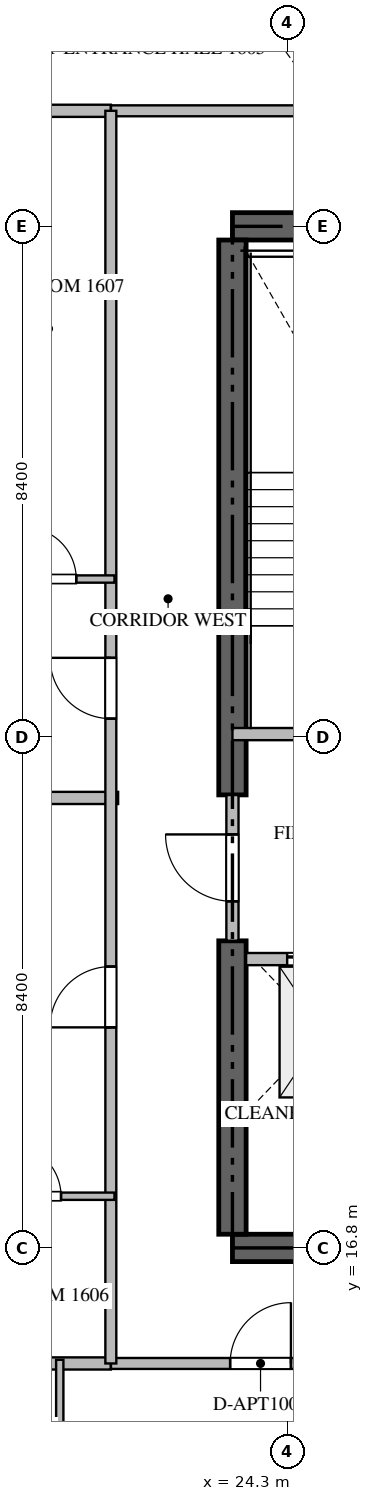
"""IFC4 building model, lengths in metres.
Left out: names, types, materials, properties, quantities, classifications, styles, units other than length and angle.
Written with IfcOpenShell. Run it as: python <this file> out.ifc"""

import sys

from ifc_helpers import new_model, si_unit, direction, frame, frame_2d, origin, place, context, subcontext, project, spatial, rectangle, extrude, source, transform, mapped, element, fill, save


model = new_model("IFC4")
c1 = context("Model", 3, precision=1e-05, world=origin(), true_north=direction((0.0, 1.0)))
c2 = subcontext(c1, "Body", "Model", "MODEL_VIEW")
j1 = project(units=[si_unit("LENGTHUNIT", "METRE"), si_unit("PLANEANGLEUNIT", "RADIAN")], contexts=[c1])
p1 = place(None, origin())
s1 = spatial("IfcSite", under=j1, at=p1, CompositionType="ELEMENT")
p2 = place(p1, origin())
s2 = spatial("IfcBuilding", under=s1, at=p2, CompositionType="ELEMENT")
p3 = place(p2, frame((0.0, 0.0, 67.95)))
s3 = spatial("IfcBuildingStorey", under=s2, at=p3, CompositionType="ELEMENT", Elevation=67.95)
for number, where, z_axis, x_axis in (
    (1, (23.4, 16.8, -0.26), (0.0, 0.0, 1.0), (1.0, 0.0, 0.0)),
    (2, (41.4, 33.6, -0.26), (0.0, 0.0, 1.0), (-1.0, 0.0, 0.0)),
):
    element("IfcWall", number, at=place(p3, frame(where, z_axis=z_axis, x_axis=x_axis)), inside=s3, PredefinedType="SHEAR", context=c2, shape_type="SweptSolid", body=[
        extrude(rectangle(XDim=18.0, YDim=0.45, at=frame_2d((9.0, 0.0))), origin(), (0.0, 0.0, 1.0), 3.748),
    ])
p4 = place(p3, frame((23.4, 17.025, -0.26), z_axis=(0.0, 0.0, 1.0), x_axis=(0.0, 1.0, 0.0)))
e3 = element("IfcWall", 3, at=p4, inside=s3, PredefinedType="SHEAR", context=c2, shape_type="SweptSolid", body=[
    extrude(rectangle(XDim=4.825, YDim=0.45, at=frame_2d((2.413, 0.0))), origin(), (0.0, 0.0, 1.0), 3.748),
])
p5 = place(p3, frame((23.4, 24.25, -0.26), z_axis=(0.0, 0.0, 1.0), x_axis=(0.0, 1.0, 0.0)))
e4 = element("IfcWall", 4, at=p5, inside=s3, PredefinedType="SHEAR", context=c2, shape_type="SweptSolid", body=[
    extrude(rectangle(XDim=9.125, YDim=0.45, at=frame_2d((4.562, 0.0))), origin(), (0.0, 0.0, 1.0), 3.748),
])
p6 = place(p3, frame((23.4, 25.25, 0.0), z_axis=(0.0, 0.0, 1.0), x_axis=(1.0, 0.0, 0.0)))
e5 = element("IfcWall", 5, at=p6, inside=s3, PredefinedType="STANDARD", context=c2, shape_type="SweptSolid", body=[
    extrude(rectangle(XDim=4.45, YDim=0.2, at=frame_2d((2.225, 0.0))), origin(), (0.0, 0.0, 1.0), 3.49),
])
p7 = place(p6, frame((1.65, 0.0, 0.0)))
e6 = element("IfcOpeningElement", 6, at=p7, cuts=e5, PredefinedType="OPENING", context=c2, shape_type="SweptSolid", body=[
    extrude(rectangle(XDim=1.1, YDim=2.15, at=frame_2d((0.55, 1.075))), frame((0.0, 0.11, 0.0), z_axis=(0.0, -1.0, 0.0), x_axis=(1.0, 0.0, 0.0)), (0.0, 0.0, 1.0), 0.22),
])
p8 = place(p3, frame((23.625, 21.55, 0.0), z_axis=(0.0, 0.0, 1.0), x_axis=(1.0, 0.0, 0.0)))
e7 = element("IfcWall", 7, at=p8, inside=s3, PredefinedType="STANDARD", context=c2, shape_type="SweptSolid", body=[
    extrude(rectangle(XDim=2.425, YDim=0.2, at=frame_2d((1.212, 0.0))), origin(), (0.0, 0.0, 1.0), 3.49),
])
p9 = place(p8, frame((0.675, 0.0, 0.0)))
e8 = element("IfcOpeningElement", 8, at=p9, cuts=e7, PredefinedType="OPENING", context=c2, shape_type="SweptSolid", body=[
    extrude(rectangle(XDim=1.2, YDim=2.2, at=frame_2d((0.6, 1.1))), frame((0.0, 0.11, 0.0), z_axis=(0.0, -1.0, 0.0), x_axis=(1.0, 0.0, 0.0)), (0.0, 0.0, 1.0), 0.22),
])
p10 = place(p3, frame((23.625, 19.05, 0.0), z_axis=(0.0, 0.0, 1.0), x_axis=(1.0, 0.0, 0.0)))
e9 = element("IfcWall", 9, at=p10, inside=s3, PredefinedType="STANDARD", context=c2, shape_type="SweptSolid", body=[
    extrude(rectangle(XDim=2.425, YDim=0.2, at=frame_2d((1.212, 0.0))), origin(), (0.0, 0.0, 1.0), 3.49),
])
p11 = place(p3, frame((23.4, 21.852, 0.0), z_axis=(0.0, 0.0, 1.0), x_axis=(0.0, 1.0, 0.0)))
e10 = element("IfcWall", 10, at=p11, inside=s3, PredefinedType="STANDARD", context=c2, shape_type="SweptSolid", body=[
    extrude(rectangle(XDim=2.396, YDim=0.2, at=frame_2d((1.198, 0.0))), origin(), (0.0, 0.0, 1.0), 3.49),
])
p12 = place(p11, frame((0.648, 0.0, 0.0)))
e11 = element("IfcOpeningElement", 11, at=p12, cuts=e10, PredefinedType="OPENING", context=c2, shape_type="SweptSolid", body=[
    extrude(rectangle(XDim=1.1, YDim=2.15, at=frame_2d((0.55, 1.075))), frame((0.0, 0.11, 0.0), z_axis=(0.0, -1.0, 0.0), x_axis=(1.0, 0.0, 0.0)), (0.0, 0.0, 1.0), 0.22),
])
p13 = place(p3, frame((6.082, 24.2, 0.0), z_axis=(0.0, 0.0, 1.0), x_axis=(1.0, 0.0, 0.0)))
e12 = element("IfcWall", 12, at=p13, inside=s3, PredefinedType="PARTITIONING", context=c2, shape_type="SweptSolid", body=[
    extrude(rectangle(XDim=15.438, YDim=0.2, at=frame_2d((7.719, 0.0))), origin(), (0.0, 0.0, 1.0), 3.49),
])
for number, where, z_axis, x_axis in (
    (13, (6.082, 14.9, 0.0), (0.0, 0.0, 1.0), (1.0, 0.0, 0.0)),
    (14, (6.082, 35.5, 0.0), (0.0, 0.0, 1.0), (1.0, 0.0, 0.0)),
):
    element("IfcWall", number, at=place(p3, frame(where, z_axis=z_axis, x_axis=x_axis)), inside=s3, PredefinedType="PARTITIONING", context=c2, shape_type="SweptSolid", body=[
        extrude(rectangle(XDim=15.318, YDim=0.2, at=frame_2d((7.659, 0.0))), origin(), (0.0, 0.0, 1.0), 3.49),
    ])
p14 = place(p3, frame((21.402, 14.9, 0.0), z_axis=(0.0, 0.0, 1.0), x_axis=(1.0, 0.0, 0.0)))
e15 = element("IfcWall", 15, at=p14, inside=s3, PredefinedType="PARTITIONING", context=c2, shape_type="SweptSolid", body=[
    extrude(rectangle(XDim=21.996, YDim=0.18, at=frame_2d((10.998, 0.0))), origin(), (0.0, 0.0, 1.0), 3.49),
])
p15 = place(p14, frame((1.96, 0.0, 0.0)))
e16 = element("IfcOpeningElement", 16, at=p15, cuts=e15, PredefinedType="OPENING", context=c2, shape_type="SweptSolid", body=[
    extrude(rectangle(XDim=1.0, YDim=2.15, at=frame_2d((0.5, 1.075))), frame((0.0, 0.1, 0.0), z_axis=(0.0, -1.0, 0.0), x_axis=(1.0, 0.0, 0.0)), (0.0, 0.0, 1.0), 0.2),
])
p16 = place(p14, frame((5.249, 0.0, 0.0)))
e17 = element("IfcOpeningElement", 17, at=p16, cuts=e15, PredefinedType="OPENING", context=c2, shape_type="SweptSolid", body=[
    extrude(rectangle(XDim=1.0, YDim=2.15, at=frame_2d((0.5, 1.075))), frame((0.0, 0.1, 0.0), z_axis=(0.0, -1.0, 0.0), x_axis=(1.0, 0.0, 0.0)), (0.0, 0.0, 1.0), 0.2),
])
p17 = place(p14, frame((11.653, 0.0, 0.0)))
e18 = element("IfcOpeningElement", 18, at=p17, cuts=e15, PredefinedType="OPENING", context=c2, shape_type="SweptSolid", body=[
    extrude(rectangle(XDim=1.0, YDim=2.15, at=frame_2d((0.5, 1.075))), frame((0.0, 0.1, 0.0), z_axis=(0.0, -1.0, 0.0), x_axis=(1.0, 0.0, 0.0)), (0.0, 0.0, 1.0), 0.2),
])
p18 = place(p14, frame((18.896, 0.0, 0.0)))
e19 = element("IfcOpeningElement", 19, at=p18, cuts=e15, PredefinedType="OPENING", context=c2, shape_type="SweptSolid", body=[
    extrude(rectangle(XDim=1.0, YDim=2.15, at=frame_2d((0.5, 1.075))), frame((0.0, 0.1, 0.0), z_axis=(0.0, -1.0, 0.0), x_axis=(1.0, 0.0, 0.0)), (0.0, 0.0, 1.0), 0.2),
])
p19 = place(p3, frame((21.402, 35.5, 0.0), z_axis=(0.0, 0.0, 1.0), x_axis=(1.0, 0.0, 0.0)))
e20 = element("IfcWall", 20, at=p19, inside=s3, PredefinedType="PARTITIONING", context=c2, shape_type="SweptSolid", body=[
    extrude(rectangle(XDim=21.996, YDim=0.18, at=frame_2d((10.998, 0.0))), origin(), (0.0, 0.0, 1.0), 3.49),
])
p20 = place(p19, frame((7.202, 0.0, 0.0)))
e21 = element("IfcOpeningElement", 21, at=p20, cuts=e20, PredefinedType="OPENING", context=c2, shape_type="SweptSolid", body=[
    extrude(rectangle(XDim=1.0, YDim=2.15, at=frame_2d((0.5, 1.075))), frame((0.0, 0.1, 0.0), z_axis=(0.0, -1.0, 0.0), x_axis=(1.0, 0.0, 0.0)), (0.0, 0.0, 1.0), 0.2),
])
p21 = place(p3, frame((21.4, 14.9, 0.0), z_axis=(0.0, 0.0, 1.0), x_axis=(0.0, 1.0, 0.0)))
e22 = element("IfcWall", 22, at=p21, inside=s3, PredefinedType="PARTITIONING", context=c2, shape_type="SweptSolid", body=[
    extrude(rectangle(XDim=20.6, YDim=0.18, at=frame_2d((10.3, 0.0))), origin(), (0.0, 0.0, 1.0), 3.49),
])
p22 = place(p21, frame((5.527, 0.0, 0.0)))
e23 = element("IfcOpeningElement", 23, at=p22, cuts=e22, PredefinedType="OPENING", context=c2, shape_type="SweptSolid", body=[
    extrude(rectangle(XDim=1.0, YDim=2.15, at=frame_2d((0.5, 1.075))), frame((0.0, 0.1, 0.0), z_axis=(0.0, -1.0, 0.0), x_axis=(1.0, 0.0, 0.0)), (0.0, 0.0, 1.0), 0.2),
])
p23 = place(p21, frame((10.604, 0.0, 0.0)))
e24 = element("IfcOpeningElement", 24, at=p23, cuts=e22, PredefinedType="OPENING", context=c2, shape_type="SweptSolid", body=[
    extrude(rectangle(XDim=1.0, YDim=2.15, at=frame_2d((0.5, 1.075))), frame((0.0, 0.1, 0.0), z_axis=(0.0, -1.0, 0.0), x_axis=(1.0, 0.0, 0.0)), (0.0, 0.0, 1.0), 0.2),
])
p24 = place(p3, frame((20.56, 12.15, 0.0), z_axis=(0.0, 0.0, 1.0), x_axis=(0.0, 1.0, 0.0)))
e25 = element("IfcWall", 25, at=p24, inside=s3, PredefinedType="PARTITIONING", context=c2, shape_type="SweptSolid", body=[
    extrude(rectangle(XDim=2.81, YDim=0.12, at=frame_2d((1.405, 0.0))), origin(), (0.0, 0.0, 1.0), 3.49),
])
p25 = place(p3, frame((18.852, 17.65, 0.0), z_axis=(0.0, 0.0, 1.0), x_axis=(1.0, 0.0, 0.0)))
e26 = element("IfcWall", 26, at=p25, inside=s3, PredefinedType="PARTITIONING", context=c2, shape_type="SweptSolid", body=[
    extrude(rectangle(XDim=2.608, YDim=0.12, at=frame_2d((1.304, 0.0))), origin(), (0.0, 0.0, 1.0), 3.49),
])
p26 = place(p25, frame((0.879, 0.0, 0.0)))
e27 = element("IfcOpeningElement", 27, at=p26, cuts=e26, PredefinedType="OPENING", context=c2, shape_type="SweptSolid", body=[
    extrude(rectangle(XDim=0.85, YDim=2.1, at=frame_2d((0.425, 1.05))), frame((0.0, 0.07, 0.0), z_axis=(0.0, -1.0, 0.0), x_axis=(1.0, 0.0, 0.0)), (0.0, 0.0, 1.0), 0.14),
])
p27 = place(p3, frame((19.352, 27.8, 0.0), z_axis=(0.0, 0.0, 1.0), x_axis=(1.0, 0.0, 0.0)))
e28 = element("IfcWall", 28, at=p27, inside=s3, PredefinedType="PARTITIONING", context=c2, shape_type="SweptSolid", body=[
    extrude(rectangle(XDim=2.108, YDim=0.12, at=frame_2d((1.054, 0.0))), origin(), (0.0, 0.0, 1.0), 3.49),
])
p28 = place(p27, frame((0.629, 0.0, 0.0)))
e29 = element("IfcOpeningElement", 29, at=p28, cuts=e28, PredefinedType="OPENING", context=c2, shape_type="SweptSolid", body=[
    extrude(rectangle(XDim=0.85, YDim=2.1, at=frame_2d((0.425, 1.05))), frame((0.0, 0.07, 0.0), z_axis=(0.0, -1.0, 0.0), x_axis=(1.0, 0.0, 0.0)), (0.0, 0.0, 1.0), 0.14),
])
m1 = source(origin(), c2, "Body", "SweptSolid", [
    extrude(rectangle(XDim=1.2, YDim=2.2, at=frame_2d((0.6, 1.1))), frame((0.0, 0.025, 0.0), z_axis=(0.0, -1.0, 0.0), x_axis=(1.0, 0.0, 0.0)), (0.0, 0.0, 1.0), 0.05),
])
p29 = place(p9, origin())
e30 = element("IfcDoor", 30, at=p29, inside=s3, OperationType="DOUBLE_DOOR_SLIDING", PredefinedType="DOOR", context=c2, shape_type="MappedRepresentation", body=[
    mapped(m1, transform((0.0, 0.0, 0.0), scale=1.0)),
])
fill(e8, e30)
m2 = source(origin(), c2, "Body", "SweptSolid", [
    extrude(rectangle(XDim=1.1, YDim=2.15, at=frame_2d((0.55, 1.075))), frame((0.0, 0.025, 0.0), z_axis=(0.0, -1.0, 0.0), x_axis=(1.0, 0.0, 0.0)), (0.0, 0.0, 1.0), 0.05),
])
p30 = place(p12, origin())
e31 = element("IfcDoor", 31, at=p30, inside=s3, OperationType="SINGLE_SWING_RIGHT", PredefinedType="DOOR", context=c2, shape_type="MappedRepresentation", body=[
    mapped(m2, transform((0.0, 0.0, 0.0), scale=1.0)),
])
fill(e11, e31)
m3 = source(origin(), c2, "Body", "SweptSolid", [
    extrude(rectangle(XDim=1.0, YDim=2.15, at=frame_2d((0.5, 1.075))), frame((0.0, 0.025, 0.0), z_axis=(0.0, -1.0, 0.0), x_axis=(1.0, 0.0, 0.0)), (0.0, 0.0, 1.0), 0.05),
])
p31 = place(p15, origin())
e32 = element("IfcDoor", 32, at=p31, inside=s3, OperationType="SINGLE_SWING_RIGHT", PredefinedType="DOOR", context=c2, shape_type="MappedRepresentation", body=[
    mapped(m3, transform((0.0, 0.0, 0.0), scale=1.0)),
])
fill(e16, e32)
p32 = place(p22, origin())
e33 = element("IfcDoor", 33, at=p32, inside=s3, OperationType="SINGLE_SWING_LEFT", PredefinedType="DOOR", context=c2, shape_type="MappedRepresentation", body=[
    mapped(m3, transform((0.0, 0.0, 0.0), scale=1.0)),
])
fill(e23, e33)
p33 = place(p23, origin())
e34 = element("IfcDoor", 34, at=p33, inside=s3, OperationType="SINGLE_SWING_RIGHT", PredefinedType="DOOR", context=c2, shape_type="MappedRepresentation", body=[
    mapped(m3, transform((0.0, 0.0, 0.0), scale=1.0)),
])
fill(e24, e34)
m4 = source(origin(), c2, "Body", "SweptSolid", [
    extrude(rectangle(XDim=0.85, YDim=2.1, at=frame_2d((0.425, 1.05))), frame((0.0, 0.025, 0.0), z_axis=(0.0, -1.0, 0.0), x_axis=(1.0, 0.0, 0.0)), (0.0, 0.0, 1.0), 0.05),
])
p34 = place(p26, origin())
e35 = element("IfcDoor", 35, at=p34, inside=s3, OperationType="SINGLE_SWING_LEFT", PredefinedType="DOOR", context=c2, shape_type="MappedRepresentation", body=[
    mapped(m4, transform((0.0, 0.0, 0.0), scale=1.0)),
])
fill(e27, e35)
p35 = place(p28, origin())
e36 = element("IfcDoor", 36, at=p35, inside=s3, OperationType="SINGLE_SWING_LEFT", PredefinedType="DOOR", context=c2, shape_type="MappedRepresentation", body=[
    mapped(m4, transform((0.0, 0.0, 0.0), scale=1.0)),
])
fill(e29, e36)
save(model, sys.argv[1])
